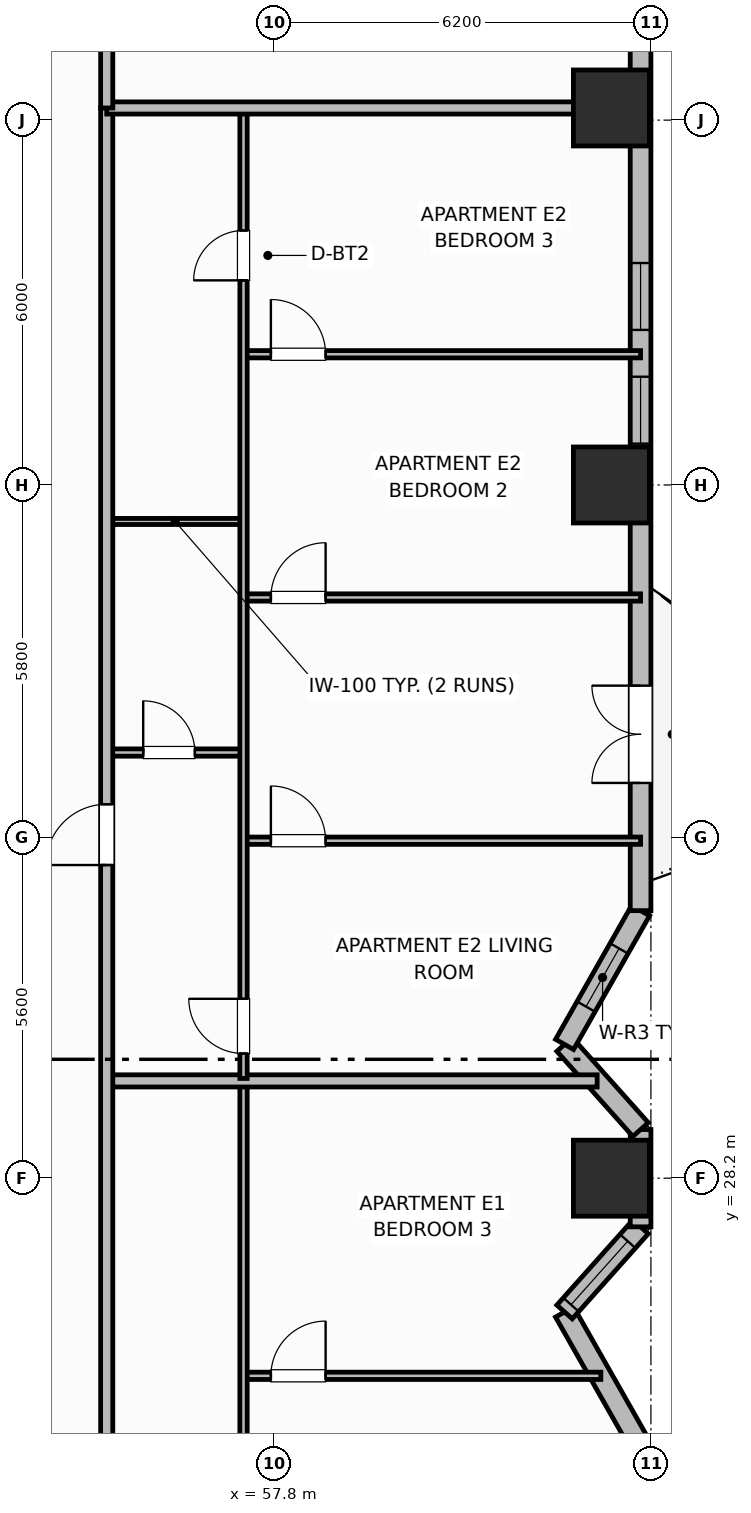
"""IFC4 building model, lengths in metres.
Left out: names, types, materials, properties, quantities, classifications, styles, units other than length and angle.
Written with IfcOpenShell. Run it as: python <this file> out.ifc"""

import sys

from ifc_helpers import new_model, si_unit, direction, frame, frame_2d, origin, origin_2d, place, context, subcontext, project, spatial, rectangle, extrude, element, fill, save


model = new_model("IFC4")
c1 = context("Model", 3, precision=1e-05, world=origin(), true_north=direction((0.0, 1.0)))
c2 = subcontext(c1, "Body", "Model", "MODEL_VIEW")
j1 = project(units=[si_unit("LENGTHUNIT", "METRE"), si_unit("PLANEANGLEUNIT", "RADIAN")], contexts=[c1])
p1 = place(None, origin())
s1 = spatial("IfcSite", under=j1, at=p1, CompositionType="ELEMENT")
p2 = place(p1, origin())
s2 = spatial("IfcBuilding", under=s1, at=p2, CompositionType="ELEMENT")
p3 = place(p2, frame((0.0, 0.0, 47.3)))
s3 = spatial("IfcBuildingStorey", under=s2, at=p3, CompositionType="ELEMENT", Elevation=47.3)
for number, where, z_axis, x_axis in (
    (1, (63.35, 28.2, 0.0), (0.0, 0.0, 1.0), (1.0, 0.0, 0.0)),
    (2, (63.35, 39.6, 0.0), (0.0, 0.0, 1.0), (1.0, 0.0, 0.0)),
    (3, (63.35, 45.8, 0.0), (0.0, 0.0, 1.0), (1.0, 0.0, 0.0)),
):
    element("IfcColumn", number, at=place(p3, frame(where, z_axis=z_axis, x_axis=x_axis)), inside=s3, PredefinedType="COLUMN", context=c2, shape_type="SweptSolid", body=[
        extrude(rectangle(XDim=1.25, YDim=1.25, at=origin_2d()), origin(), (0.0, 0.0, 1.0), 3.7),
    ])
p4 = place(p3, frame((63.83, 23.8, 0.0), z_axis=(0.0, 0.0, 1.0), x_axis=(-0.494017696272, 0.869451847873, 0.0)))
e4 = element("IfcWall", 4, at=p4, inside=s3, PredefinedType="SOLIDWALL", context=c2, shape_type="SweptSolid", body=[
    extrude(rectangle(XDim=2.53, YDim=0.34, at=frame_2d((1.265, 0.0))), origin(), (0.0, 0.0, 1.0), 2.7),
])
p5 = place(p3, frame((62.58, 26.0, 0.0), z_axis=(0.0, 0.0, 1.0), x_axis=(0.666041619974, 0.74591457987, 0.0)))
e5 = element("IfcWall", 5, at=p5, inside=s3, PredefinedType="SOLIDWALL", context=c2, shape_type="SweptSolid", body=[
    extrude(rectangle(XDim=1.877, YDim=0.34, at=frame_2d((0.938, 0.0))), origin(), (0.0, 0.0, 1.0), 2.7),
])
p6 = place(p5, frame((0.16, 0.0, 0.69)))
e6 = element("IfcOpeningElement", 6, at=p6, cuts=e5, PredefinedType="OPENING", context=c2, shape_type="SweptSolid", body=[
    extrude(rectangle(XDim=1.4, YDim=1.85, at=frame_2d((0.7, 0.925))), frame((0.0, 0.18, 0.0), z_axis=(0.0, -1.0, 0.0), x_axis=(1.0, 0.0, 0.0)), (0.0, 0.0, 1.0), 0.36),
])
p7 = place(p3, frame((63.83, 27.4, 0.0), z_axis=(0.0, 0.0, 1.0), x_axis=(0.0, 1.0, 0.0)))
e7 = element("IfcWall", 7, at=p7, inside=s3, PredefinedType="SOLIDWALL", context=c2, shape_type="SweptSolid", body=[
    extrude(rectangle(XDim=1.6, YDim=0.34, at=frame_2d((0.8, 0.0))), origin(), (0.0, 0.0, 1.0), 2.7),
])
p8 = place(p3, frame((63.83, 29.0, 0.0), z_axis=(0.0, 0.0, 1.0), x_axis=(-0.666041619974, 0.74591457987, 0.0)))
e8 = element("IfcWall", 8, at=p8, inside=s3, PredefinedType="SOLIDWALL", context=c2, shape_type="SweptSolid", body=[
    extrude(rectangle(XDim=1.877, YDim=0.34, at=frame_2d((0.938, 0.0))), origin(), (0.0, 0.0, 1.0), 2.7),
])
p9 = place(p3, frame((62.58, 30.4, 0.0), z_axis=(0.0, 0.0, 1.0), x_axis=(0.493976255291, 0.869475393101, 0.0)))
e9 = element("IfcWall", 9, at=p9, inside=s3, PredefinedType="SOLIDWALL", context=c2, shape_type="SweptSolid", body=[
    extrude(rectangle(XDim=2.531, YDim=0.34, at=frame_2d((1.265, 0.0))), origin(), (0.0, 0.0, 1.0), 2.7),
])
p10 = place(p9, frame((0.715, 0.0, 0.89)))
e10 = element("IfcOpeningElement", 10, at=p10, cuts=e9, PredefinedType="OPENING", context=c2, shape_type="SweptSolid", body=[
    extrude(rectangle(XDim=1.1, YDim=1.65, at=frame_2d((0.55, 0.825))), frame((0.0, 0.18, 0.0), z_axis=(0.0, -1.0, 0.0), x_axis=(1.0, 0.0, 0.0)), (0.0, 0.0, 1.0), 0.36),
])
p11 = place(p3, frame((63.83, 32.6, 0.0), z_axis=(0.0, 0.0, 1.0), x_axis=(0.0, 1.0, 0.0)))
e11 = element("IfcWall", 11, at=p11, inside=s3, PredefinedType="SOLIDWALL", context=c2, shape_type="SweptSolid", body=[
    extrude(rectangle(XDim=14.8, YDim=0.34, at=frame_2d((7.4, 0.0))), origin(), (0.0, 0.0, 1.0), 2.7),
])
p12 = place(p11, frame((2.1, 0.0, 0.0)))
e12 = element("IfcOpeningElement", 12, at=p12, cuts=e11, PredefinedType="OPENING", context=c2, shape_type="SweptSolid", body=[
    extrude(rectangle(XDim=1.6, YDim=2.1, at=frame_2d((0.8, 1.05))), frame((0.0, 0.18, 0.0), z_axis=(0.0, -1.0, 0.0), x_axis=(1.0, 0.0, 0.0)), (0.0, 0.0, 1.0), 0.36),
])
p13 = place(p11, frame((7.68, 0.0, 0.89)))
e13 = element("IfcOpeningElement", 13, at=p13, cuts=e11, PredefinedType="OPENING", context=c2, shape_type="SweptSolid", body=[
    extrude(rectangle(XDim=1.1, YDim=1.65, at=frame_2d((0.55, 0.825))), frame((0.0, 0.18, 0.0), z_axis=(0.0, -1.0, 0.0), x_axis=(1.0, 0.0, 0.0)), (0.0, 0.0, 1.0), 0.36),
])
p14 = place(p11, frame((9.55, 0.0, 0.93)))
e14 = element("IfcOpeningElement", 14, at=p14, cuts=e11, PredefinedType="OPENING", context=c2, shape_type="SweptSolid", body=[
    extrude(rectangle(XDim=1.1, YDim=1.65, at=frame_2d((0.55, 0.825))), frame((0.0, 0.18, 0.0), z_axis=(0.0, -1.0, 0.0), x_axis=(1.0, 0.0, 0.0)), (0.0, 0.0, 1.0), 0.36),
])
p15 = place(p3, frame((57.3, 24.95, 0.0), z_axis=(0.0, 0.0, 1.0), x_axis=(1.0, 0.0, 0.0)))
e15 = element("IfcWall", 15, at=p15, inside=s3, PredefinedType="PARTITIONING", context=c2, shape_type="SweptSolid", body=[
    extrude(rectangle(XDim=5.876, YDim=0.12, at=frame_2d((2.938, 0.0))), origin(), (0.0, 0.0, 1.0), 2.53),
])
p16 = place(p15, frame((0.45, 0.0, 0.0)))
e16 = element("IfcOpeningElement", 16, at=p16, cuts=e15, PredefinedType="OPENING", context=c2, shape_type="SweptSolid", body=[
    extrude(rectangle(XDim=0.9, YDim=2.1, at=frame_2d((0.45, 1.05))), frame((0.0, 0.07, 0.0), z_axis=(0.0, -1.0, 0.0), x_axis=(1.0, 0.0, 0.0)), (0.0, 0.0, 1.0), 0.14),
])
p17 = place(p3, frame((57.3, 10.64, 0.0), z_axis=(0.0, 0.0, 1.0), x_axis=(0.0, 1.0, 0.0)))
e17 = element("IfcWall", 17, at=p17, inside=s3, PredefinedType="PARTITIONING", context=c2, shape_type="SweptSolid", body=[
    extrude(rectangle(XDim=19.12, YDim=0.12, at=frame_2d((9.56, 0.0))), origin(), (0.0, 0.0, 1.0), 2.53),
])
p18 = place(p17, frame((0.41, 0.0, 0.0)))
e18 = element("IfcOpeningElement", 18, at=p18, cuts=e17, PredefinedType="OPENING", context=c2, shape_type="SweptSolid", body=[
    extrude(rectangle(XDim=0.9, YDim=2.1, at=frame_2d((0.45, 1.05))), frame((0.0, 0.07, 0.0), z_axis=(0.0, -1.0, 0.0), x_axis=(1.0, 0.0, 0.0)), (0.0, 0.0, 1.0), 0.14),
])
p19 = place(p17, frame((12.105, 0.0, 0.0)))
e19 = element("IfcOpeningElement", 19, at=p19, cuts=e17, PredefinedType="OPENING", context=c2, shape_type="SweptSolid", body=[
    extrude(rectangle(XDim=0.82, YDim=2.08, at=frame_2d((0.41, 1.04))), frame((0.0, 0.07, 0.0), z_axis=(0.0, -1.0, 0.0), x_axis=(1.0, 0.0, 0.0)), (0.0, 0.0, 1.0), 0.14),
])
p20 = place(p3, frame((55.05, 29.8, 0.0), z_axis=(0.0, 0.0, 1.0), x_axis=(1.0, 0.0, 0.0)))
e20 = element("IfcWall", 20, at=p20, inside=s3, PredefinedType="PARTITIONING", context=c2, shape_type="SweptSolid", body=[
    extrude(rectangle(XDim=8.066, YDim=0.2, at=frame_2d((4.033, 0.0))), origin(), (0.0, 0.0, 1.0), 2.53),
])
p21 = place(p3, frame((55.05, 35.2, 0.0), z_axis=(0.0, 0.0, 1.0), x_axis=(1.0, 0.0, 0.0)))
e21 = element("IfcWall", 21, at=p21, inside=s3, PredefinedType="PARTITIONING", context=c2, shape_type="SweptSolid", body=[
    extrude(rectangle(XDim=2.25, YDim=0.12, at=frame_2d((1.125, 0.0))), origin(), (0.0, 0.0, 1.0), 2.53),
])
p22 = place(p21, frame((0.6, 0.0, 0.0)))
e22 = element("IfcOpeningElement", 22, at=p22, cuts=e21, PredefinedType="OPENING", context=c2, shape_type="SweptSolid", body=[
    extrude(rectangle(XDim=0.85, YDim=2.1, at=frame_2d((0.425, 1.05))), frame((0.0, 0.07, 0.0), z_axis=(0.0, -1.0, 0.0), x_axis=(1.0, 0.0, 0.0)), (0.0, 0.0, 1.0), 0.14),
])
p23 = place(p3, frame((55.05, 39.0, 0.0), z_axis=(0.0, 0.0, 1.0), x_axis=(1.0, 0.0, 0.0)))
e23 = element("IfcWall", 23, at=p23, inside=s3, PredefinedType="PARTITIONING", context=c2, shape_type="SweptSolid", body=[
    extrude(rectangle(XDim=2.25, YDim=0.1, at=frame_2d((1.125, 0.0))), origin(), (0.0, 0.0, 1.0), 2.53),
])
p24 = place(p3, frame((57.3, 33.75, 0.0), z_axis=(0.0, 0.0, 1.0), x_axis=(1.0, 0.0, 0.0)))
e24 = element("IfcWall", 24, at=p24, inside=s3, PredefinedType="PARTITIONING", context=c2, shape_type="SweptSolid", body=[
    extrude(rectangle(XDim=6.53, YDim=0.12, at=frame_2d((3.265, 0.0))), origin(), (0.0, 0.0, 1.0), 2.53),
])
p25 = place(p24, frame((0.45, 0.0, 0.0)))
e25 = element("IfcOpeningElement", 25, at=p25, cuts=e24, PredefinedType="OPENING", context=c2, shape_type="SweptSolid", body=[
    extrude(rectangle(XDim=0.9, YDim=2.1, at=frame_2d((0.45, 1.05))), frame((0.0, 0.07, 0.0), z_axis=(0.0, -1.0, 0.0), x_axis=(1.0, 0.0, 0.0)), (0.0, 0.0, 1.0), 0.14),
])
p26 = place(p3, frame((57.3, 37.75, 0.0), z_axis=(0.0, 0.0, 1.0), x_axis=(1.0, 0.0, 0.0)))
e26 = element("IfcWall", 26, at=p26, inside=s3, PredefinedType="PARTITIONING", context=c2, shape_type="SweptSolid", body=[
    extrude(rectangle(XDim=6.53, YDim=0.12, at=frame_2d((3.265, 0.0))), origin(), (0.0, 0.0, 1.0), 2.53),
])
p27 = place(p26, frame((0.45, 0.0, 0.0)))
e27 = element("IfcOpeningElement", 27, at=p27, cuts=e26, PredefinedType="OPENING", context=c2, shape_type="SweptSolid", body=[
    extrude(rectangle(XDim=0.9, YDim=2.1, at=frame_2d((0.45, 1.05))), frame((0.0, 0.07, 0.0), z_axis=(0.0, -1.0, 0.0), x_axis=(1.0, 0.0, 0.0)), (0.0, 0.0, 1.0), 0.14),
])
p28 = place(p3, frame((57.3, 41.75, 0.0), z_axis=(0.0, 0.0, 1.0), x_axis=(1.0, 0.0, 0.0)))
e28 = element("IfcWall", 28, at=p28, inside=s3, PredefinedType="PARTITIONING", context=c2, shape_type="SweptSolid", body=[
    extrude(rectangle(XDim=6.53, YDim=0.12, at=frame_2d((3.265, 0.0))), origin(), (0.0, 0.0, 1.0), 2.53),
])
p29 = place(p28, frame((0.45, 0.0, 0.0)))
e29 = element("IfcOpeningElement", 29, at=p29, cuts=e28, PredefinedType="OPENING", context=c2, shape_type="SweptSolid", body=[
    extrude(rectangle(XDim=0.9, YDim=2.1, at=frame_2d((0.45, 1.05))), frame((0.0, 0.07, 0.0), z_axis=(0.0, -1.0, 0.0), x_axis=(1.0, 0.0, 0.0)), (0.0, 0.0, 1.0), 0.14),
])
p30 = place(p3, frame((57.3, 29.84, 0.0), z_axis=(0.0, 0.0, 1.0), x_axis=(0.0, 1.0, 0.0)))
e30 = element("IfcWall", 30, at=p30, inside=s3, PredefinedType="PARTITIONING", context=c2, shape_type="SweptSolid", body=[
    extrude(rectangle(XDim=15.92, YDim=0.12, at=frame_2d((7.96, 0.0))), origin(), (0.0, 0.0, 1.0), 2.53),
])
p31 = place(p30, frame((0.41, 0.0, 0.0)))
e31 = element("IfcOpeningElement", 31, at=p31, cuts=e30, PredefinedType="OPENING", context=c2, shape_type="SweptSolid", body=[
    extrude(rectangle(XDim=0.9, YDim=2.1, at=frame_2d((0.45, 1.05))), frame((0.0, 0.07, 0.0), z_axis=(0.0, -1.0, 0.0), x_axis=(1.0, 0.0, 0.0)), (0.0, 0.0, 1.0), 0.14),
])
p32 = place(p30, frame((13.125, 0.0, 0.0)))
e32 = element("IfcOpeningElement", 32, at=p32, cuts=e30, PredefinedType="OPENING", context=c2, shape_type="SweptSolid", body=[
    extrude(rectangle(XDim=0.82, YDim=2.08, at=frame_2d((0.41, 1.04))), frame((0.0, 0.07, 0.0), z_axis=(0.0, -1.0, 0.0), x_axis=(1.0, 0.0, 0.0)), (0.0, 0.0, 1.0), 0.14),
])
p33 = place(p3, frame((55.05, 10.6, 0.0), z_axis=(0.0, 0.0, 1.0), x_axis=(0.0, 1.0, 0.0)))
e33 = element("IfcWall", 33, at=p33, inside=s3, PredefinedType="PARTITIONING", context=c2, shape_type="SweptSolid", body=[
    extrude(rectangle(XDim=35.2, YDim=0.2, at=frame_2d((17.6, 0.0))), origin(), (0.0, 0.0, 1.0), 2.53),
])
p34 = place(p33, frame((2.65, 0.0, 0.0)))
e34 = element("IfcOpeningElement", 34, at=p34, cuts=e33, PredefinedType="OPENING", context=c2, shape_type="SweptSolid", body=[
    extrude(rectangle(XDim=1.0, YDim=2.15, at=frame_2d((0.5, 1.075))), frame((0.0, 0.11, 0.0), z_axis=(0.0, -1.0, 0.0), x_axis=(1.0, 0.0, 0.0)), (0.0, 0.0, 1.0), 0.22),
])
p35 = place(p33, frame((22.75, 0.0, 0.0)))
e35 = element("IfcOpeningElement", 35, at=p35, cuts=e33, PredefinedType="OPENING", context=c2, shape_type="SweptSolid", body=[
    extrude(rectangle(XDim=1.0, YDim=2.15, at=frame_2d((0.5, 1.075))), frame((0.0, 0.11, 0.0), z_axis=(0.0, -1.0, 0.0), x_axis=(1.0, 0.0, 0.0)), (0.0, 0.0, 1.0), 0.22),
])
p36 = place(p3, frame((55.05, 45.8, 0.0), z_axis=(0.0, 0.0, 1.0), x_axis=(1.0, 0.0, 0.0)))
e36 = element("IfcWall", 36, at=p36, inside=s3, PredefinedType="PARTITIONING", context=c2, shape_type="SweptSolid", body=[
    extrude(rectangle(XDim=8.36, YDim=0.2, at=frame_2d((4.18, 0.0))), origin(), (0.0, 0.0, 1.0), 2.53),
])
p37 = place(p3, frame((55.05, 45.8, 0.0), z_axis=(0.0, 0.0, 1.0), x_axis=(0.0, 1.0, 0.0)))
e37 = element("IfcWall", 37, at=p37, inside=s3, PredefinedType="PARTITIONING", context=c2, shape_type="SweptSolid", body=[
    extrude(rectangle(XDim=5.63, YDim=0.2, at=frame_2d((2.815, 0.0))), origin(), (0.0, 0.0, 1.0), 2.53),
])
p38 = place(p6, origin())
e38 = element("IfcWindow", 38, at=p38, inside=s3, PartitioningType="SINGLE_PANEL", PredefinedType="WINDOW", context=c2, shape_type="SweptSolid", body=[
    extrude(rectangle(XDim=1.4, YDim=1.85, at=frame_2d((0.7, 0.925))), frame((0.0, 0.03, 0.0), z_axis=(0.0, -1.0, 0.0), x_axis=(1.0, 0.0, 0.0)), (0.0, 0.0, 1.0), 0.06),
])
fill(e6, e38)
p39 = place(p10, origin())
e39 = element("IfcWindow", 39, at=p39, inside=s3, PartitioningType="SINGLE_PANEL", PredefinedType="WINDOW", context=c2, shape_type="SweptSolid", body=[
    extrude(rectangle(XDim=1.1, YDim=1.65, at=frame_2d((0.55, 0.825))), frame((0.0, 0.03, 0.0), z_axis=(0.0, -1.0, 0.0), x_axis=(1.0, 0.0, 0.0)), (0.0, 0.0, 1.0), 0.06),
])
fill(e10, e39)
p40 = place(p12, origin())
e40 = element("IfcDoor", 40, at=p40, inside=s3, OperationType="DOUBLE_DOOR_SINGLE_SWING", PredefinedType="DOOR", context=c2, shape_type="SweptSolid", body=[
    extrude(rectangle(XDim=1.6, YDim=2.1, at=frame_2d((0.8, 1.05))), frame((0.0, 0.025, 0.0), z_axis=(0.0, -1.0, 0.0), x_axis=(1.0, 0.0, 0.0)), (0.0, 0.0, 1.0), 0.05),
])
fill(e12, e40)
p41 = place(p13, origin())
e41 = element("IfcWindow", 41, at=p41, inside=s3, PartitioningType="SINGLE_PANEL", PredefinedType="WINDOW", context=c2, shape_type="SweptSolid", body=[
    extrude(rectangle(XDim=1.1, YDim=1.65, at=frame_2d((0.55, 0.825))), frame((0.0, 0.03, 0.0), z_axis=(0.0, -1.0, 0.0), x_axis=(1.0, 0.0, 0.0)), (0.0, 0.0, 1.0), 0.06),
])
fill(e13, e41)
p42 = place(p14, origin())
e42 = element("IfcWindow", 42, at=p42, inside=s3, PartitioningType="SINGLE_PANEL", PredefinedType="WINDOW", context=c2, shape_type="SweptSolid", body=[
    extrude(rectangle(XDim=1.1, YDim=1.65, at=frame_2d((0.55, 0.825))), frame((0.0, 0.03, 0.0), z_axis=(0.0, -1.0, 0.0), x_axis=(1.0, 0.0, 0.0)), (0.0, 0.0, 1.0), 0.06),
])
fill(e14, e42)
p43 = place(p16, origin())
e43 = element("IfcDoor", 43, at=p43, inside=s3, OperationType="SINGLE_SWING_RIGHT", PredefinedType="DOOR", context=c2, shape_type="SweptSolid", body=[
    extrude(rectangle(XDim=0.9, YDim=2.1, at=frame_2d((0.45, 1.05))), frame((0.0, 0.025, 0.0), z_axis=(0.0, -1.0, 0.0), x_axis=(1.0, 0.0, 0.0)), (0.0, 0.0, 1.0), 0.05),
])
fill(e16, e43)
p44 = place(p22, origin())
e44 = element("IfcDoor", 44, at=p44, inside=s3, OperationType="SINGLE_SWING_LEFT", PredefinedType="DOOR", context=c2, shape_type="SweptSolid", body=[
    extrude(rectangle(XDim=0.85, YDim=2.1, at=frame_2d((0.425, 1.05))), frame((0.0, 0.025, 0.0), z_axis=(0.0, -1.0, 0.0), x_axis=(1.0, 0.0, 0.0)), (0.0, 0.0, 1.0), 0.05),
])
fill(e22, e44)
p45 = place(p25, origin())
e45 = element("IfcDoor", 45, at=p45, inside=s3, OperationType="SINGLE_SWING_LEFT", PredefinedType="DOOR", context=c2, shape_type="SweptSolid", body=[
    extrude(rectangle(XDim=0.9, YDim=2.1, at=frame_2d((0.45, 1.05))), frame((0.0, 0.025, 0.0), z_axis=(0.0, -1.0, 0.0), x_axis=(1.0, 0.0, 0.0)), (0.0, 0.0, 1.0), 0.05),
])
fill(e25, e45)
p46 = place(p27, origin())
e46 = element("IfcDoor", 46, at=p46, inside=s3, OperationType="SINGLE_SWING_RIGHT", PredefinedType="DOOR", context=c2, shape_type="SweptSolid", body=[
    extrude(rectangle(XDim=0.9, YDim=2.1, at=frame_2d((0.45, 1.05))), frame((0.0, 0.025, 0.0), z_axis=(0.0, -1.0, 0.0), x_axis=(1.0, 0.0, 0.0)), (0.0, 0.0, 1.0), 0.05),
])
fill(e27, e46)
p47 = place(p29, origin())
e47 = element("IfcDoor", 47, at=p47, inside=s3, OperationType="SINGLE_SWING_LEFT", PredefinedType="DOOR", context=c2, shape_type="SweptSolid", body=[
    extrude(rectangle(XDim=0.9, YDim=2.1, at=frame_2d((0.45, 1.05))), frame((0.0, 0.025, 0.0), z_axis=(0.0, -1.0, 0.0), x_axis=(1.0, 0.0, 0.0)), (0.0, 0.0, 1.0), 0.05),
])
fill(e29, e47)
p48 = place(p31, origin())
e48 = element("IfcDoor", 48, at=p48, inside=s3, OperationType="SINGLE_SWING_RIGHT", PredefinedType="DOOR", context=c2, shape_type="SweptSolid", body=[
    extrude(rectangle(XDim=0.9, YDim=2.1, at=frame_2d((0.45, 1.05))), frame((0.0, 0.025, 0.0), z_axis=(0.0, -1.0, 0.0), x_axis=(1.0, 0.0, 0.0)), (0.0, 0.0, 1.0), 0.05),
])
fill(e31, e48)
p49 = place(p32, origin())
e49 = element("IfcDoor", 49, at=p49, inside=s3, OperationType="SINGLE_SWING_LEFT", PredefinedType="DOOR", context=c2, shape_type="SweptSolid", body=[
    extrude(rectangle(XDim=0.82, YDim=2.08, at=frame_2d((0.41, 1.04))), frame((0.0, 0.025, 0.0), z_axis=(0.0, -1.0, 0.0), x_axis=(1.0, 0.0, 0.0)), (0.0, 0.0, 1.0), 0.05),
])
fill(e32, e49)
p50 = place(p35, origin())
e50 = element("IfcDoor", 50, at=p50, inside=s3, OperationType="SINGLE_SWING_LEFT", PredefinedType="DOOR", context=c2, shape_type="SweptSolid", body=[
    extrude(rectangle(XDim=1.0, YDim=2.15, at=frame_2d((0.5, 1.075))), frame((0.0, 0.025, 0.0), z_axis=(0.0, -1.0, 0.0), x_axis=(1.0, 0.0, 0.0)), (0.0, 0.0, 1.0), 0.05),
])
fill(e35, e50)
save(model, sys.argv[1])
